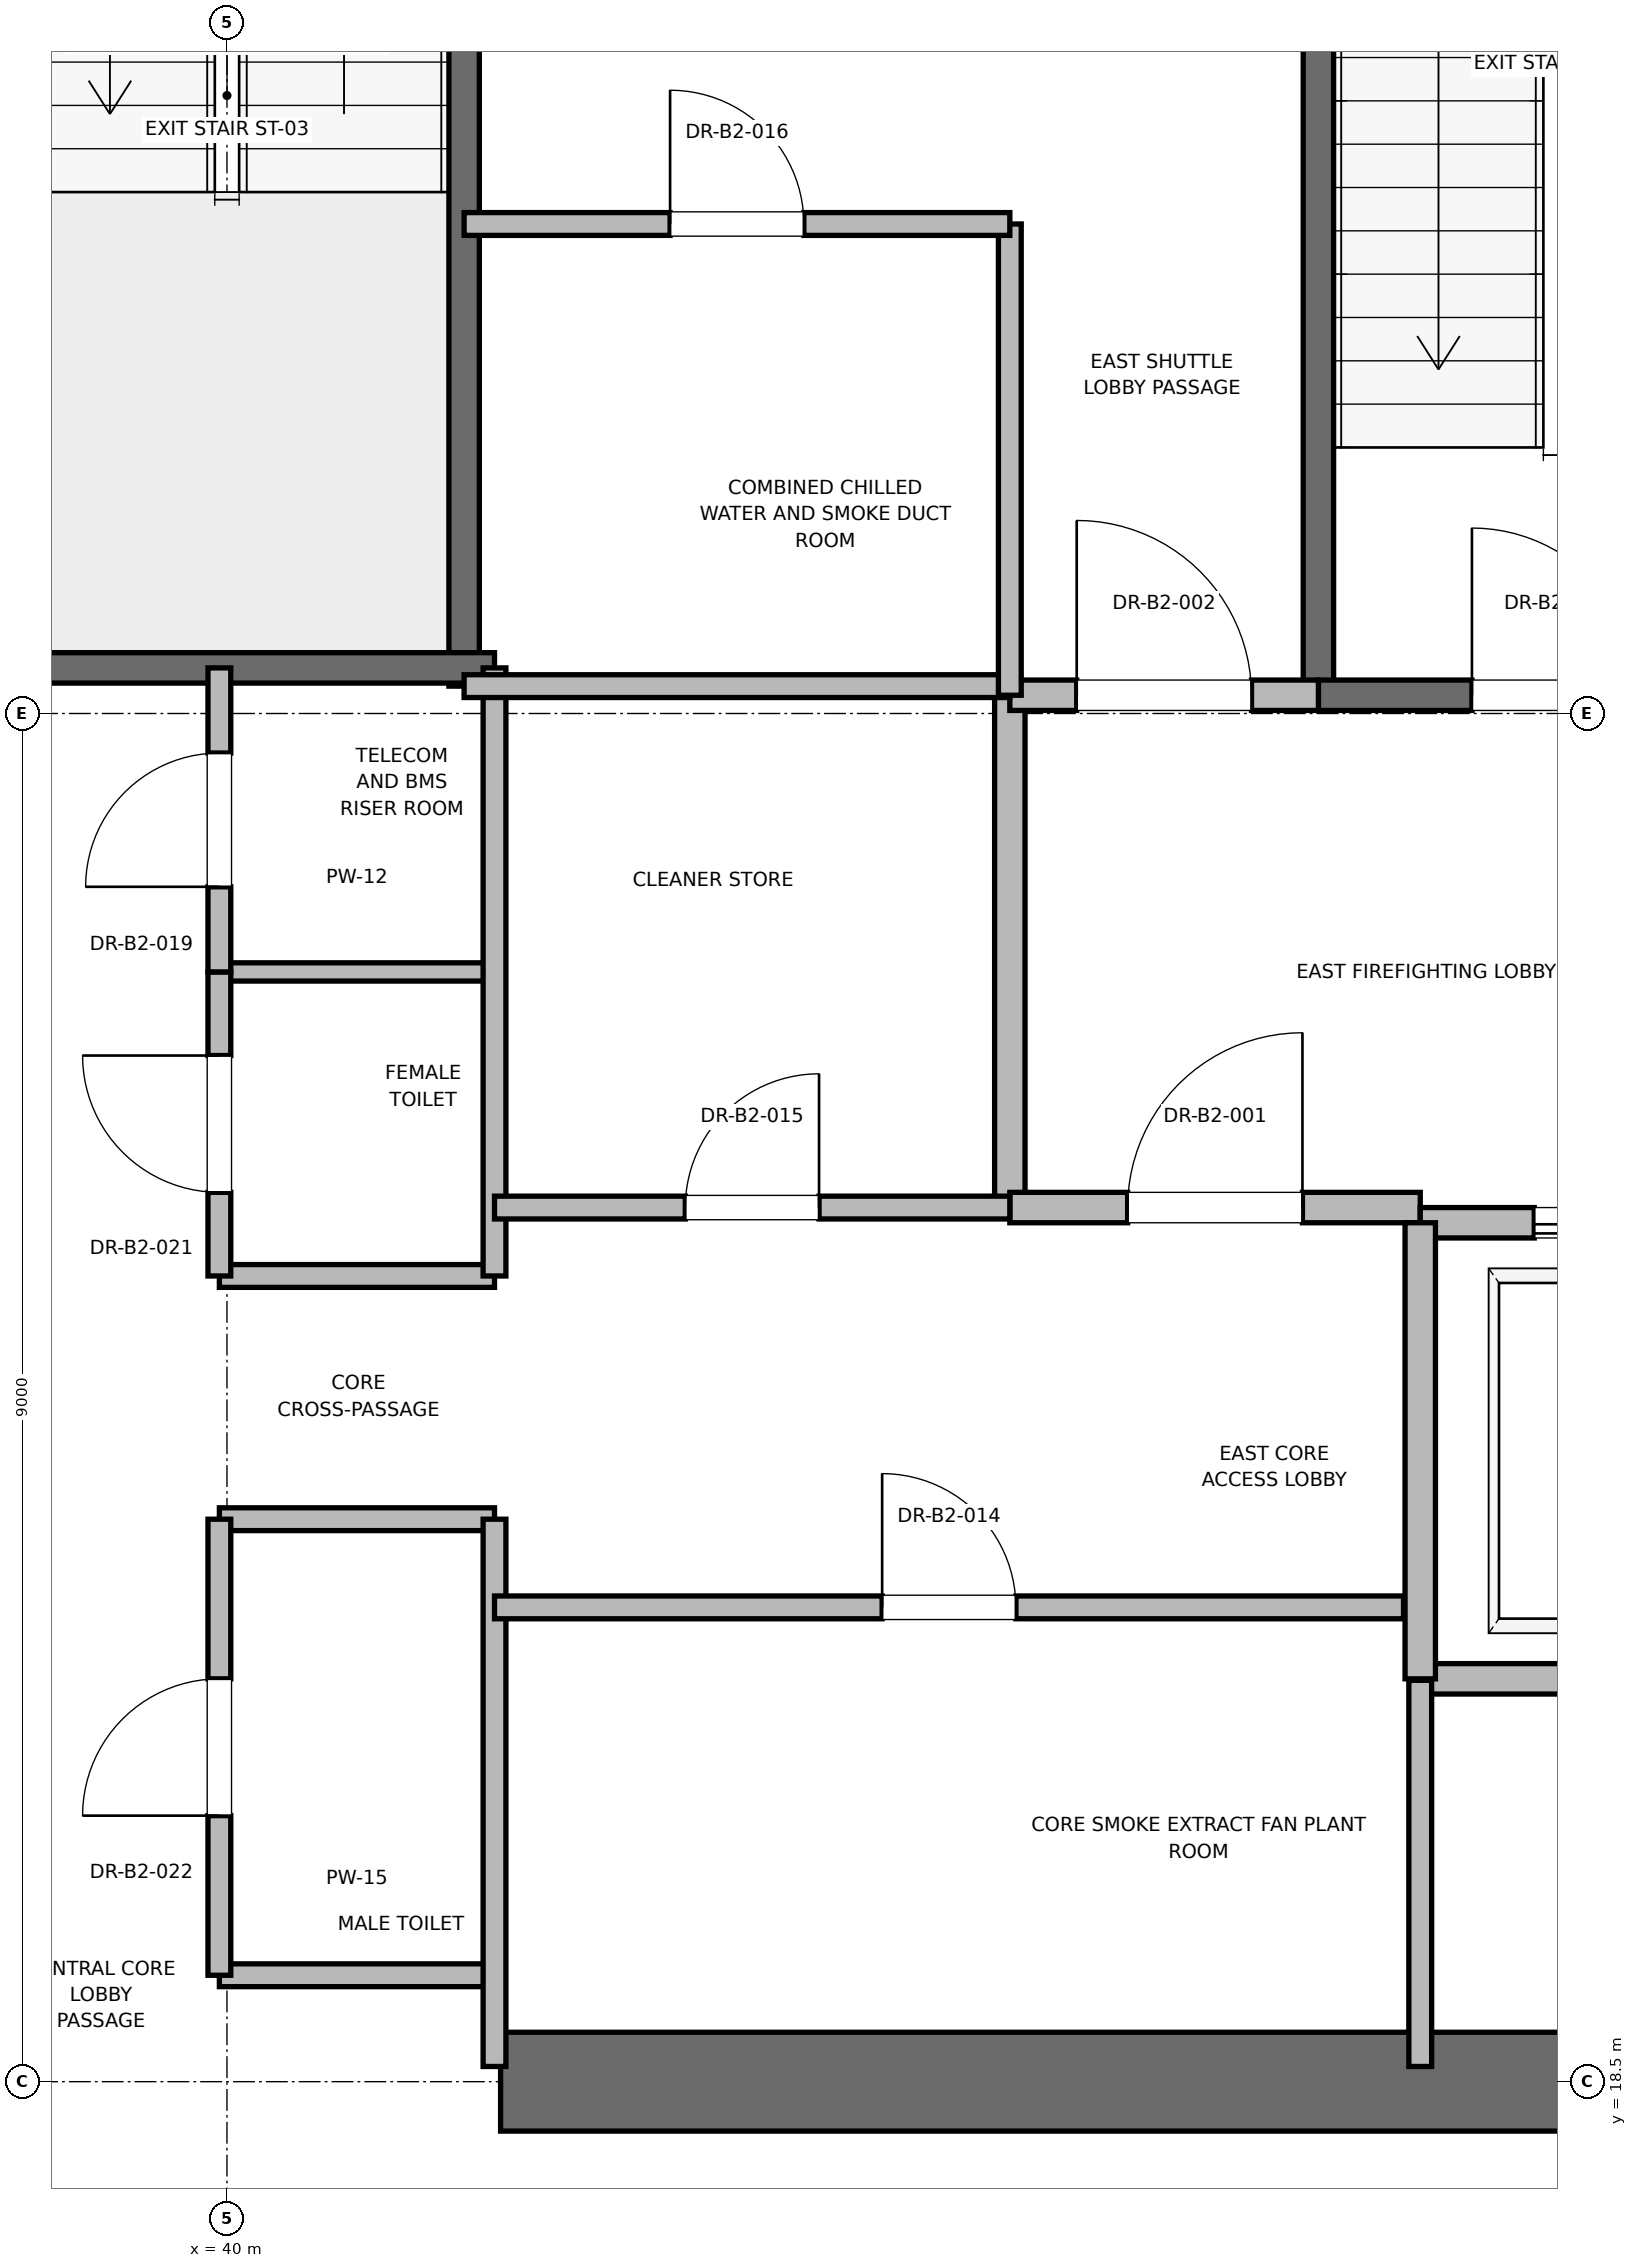
"""IFC4 building model, lengths in metres.
Left out: names, types, materials, properties, quantities, classifications, styles, units other than length and angle.
Written with IfcOpenShell. Run it as: python <this file> out.ifc"""

import sys

from ifc_helpers import new_model, si_unit, direction, frame, frame_2d, origin, place, context, subcontext, project, spatial, rectangle, extrude, element, fill, save


model = new_model("IFC4")
c1 = context("Model", 3, precision=1e-05, world=origin(), true_north=direction((0.0, 1.0)))
c2 = subcontext(c1, "Body", "Model", "MODEL_VIEW")
j1 = project(units=[si_unit("LENGTHUNIT", "METRE"), si_unit("PLANEANGLEUNIT", "RADIAN")], contexts=[c1])
p1 = place(None, origin())
s1 = spatial("IfcSite", under=j1, at=p1, CompositionType="ELEMENT")
p2 = place(p1, origin())
s2 = spatial("IfcBuilding", under=s1, at=p2, CompositionType="ELEMENT")
p3 = place(p2, frame((0.0, 0.0, -9.0)))
s3 = spatial("IfcBuildingStorey", under=s2, at=p3, CompositionType="ELEMENT", Elevation=-9.0)
p4 = place(p3, frame((41.8, 18.5, -0.3), z_axis=(0.0, 0.0, 1.0), x_axis=(1.0, 0.0, 0.0)))
e1 = element("IfcWall", 1, at=p4, inside=s3, PredefinedType="SHEAR", context=c2, shape_type="SweptSolid", body=[
    extrude(rectangle(XDim=9.2, YDim=0.65, at=frame_2d((4.6, 0.0))), origin(), (0.0, 0.0, 1.0), 4.5),
])
p5 = place(p3, frame((47.18, 27.62, -0.3), z_axis=(0.0, 0.0, 1.0), x_axis=(0.0, 1.0, 0.0)))
e2 = element("IfcWall", 2, at=p5, inside=s3, PredefinedType="SOLIDWALL", context=c2, shape_type="SweptSolid", body=[
    extrude(rectangle(XDim=8.18, YDim=0.2, at=frame_2d((4.09, 0.0))), origin(), (0.0, 0.0, 1.0), 4.5),
])
p6 = place(p3, frame((47.18, 27.62, -0.3), z_axis=(0.0, 0.0, 1.0), x_axis=(1.0, 0.0, 0.0)))
e3 = element("IfcWall", 3, at=p6, inside=s3, PredefinedType="SOLIDWALL", context=c2, shape_type="SweptSolid", body=[
    extrude(rectangle(XDim=3.12, YDim=0.2, at=frame_2d((1.56, 0.0))), origin(), (0.0, 0.0, 1.0), 4.5),
])
p7 = place(p6, frame((1.01, 0.0, 0.3)))
e4 = element("IfcOpeningElement", 4, at=p7, cuts=e3, PredefinedType="OPENING", context=c2, shape_type="SweptSolid", body=[
    extrude(rectangle(XDim=1.1, YDim=2.15, at=frame_2d((0.55, 1.075))), frame((0.0, 0.1, 0.0), z_axis=(0.0, -1.0, 0.0), x_axis=(1.0, 0.0, 0.0)), (0.0, 0.0, 1.0), 0.2),
])
p8 = place(p3, frame((41.56, 27.68, -0.3), z_axis=(0.0, 0.0, 1.0), x_axis=(0.0, 1.0, 0.0)))
e5 = element("IfcWall", 5, at=p8, inside=s3, PredefinedType="SOLIDWALL", context=c2, shape_type="SweptSolid", body=[
    extrude(rectangle(XDim=8.57, YDim=0.2, at=frame_2d((4.285, 0.0))), origin(), (0.0, 0.0, 1.0), 4.5),
])
p9 = place(p3, frame((38.44, 27.8, -0.3), z_axis=(0.0, 0.0, 1.0), x_axis=(1.0, 0.0, 0.0)))
e6 = element("IfcWall", 6, at=p9, inside=s3, PredefinedType="SOLIDWALL", context=c2, shape_type="SweptSolid", body=[
    extrude(rectangle(XDim=3.32, YDim=0.2, at=frame_2d((1.66, 0.0))), origin(), (0.0, 0.0, 1.0), 4.5),
])
p10 = place(p3, frame((45.15, 24.25, 0.0), z_axis=(0.0, 0.0, 1.0), x_axis=(0.0, 1.0, 0.0)))
e7 = element("IfcWall", 7, at=p10, inside=s3, PredefinedType="PARTITIONING", context=c2, shape_type="SweptSolid", body=[
    extrude(rectangle(XDim=3.37, YDim=0.2, at=frame_2d((1.685, 0.0))), origin(), (0.0, 0.0, 1.0), 4.2),
])
p11 = place(p3, frame((45.15, 24.25, 0.0), z_axis=(0.0, 0.0, 1.0), x_axis=(1.0, 0.0, 0.0)))
e8 = element("IfcWall", 8, at=p11, inside=s3, PredefinedType="PARTITIONING", context=c2, shape_type="SweptSolid", body=[
    extrude(rectangle(XDim=2.7, YDim=0.2, at=frame_2d((1.35, 0.0))), origin(), (0.0, 0.0, 1.0), 4.2),
])
p12 = place(p11, frame((0.775, 0.0, 0.0)))
e9 = element("IfcOpeningElement", 9, at=p12, cuts=e8, PredefinedType="OPENING", context=c2, shape_type="SweptSolid", body=[
    extrude(rectangle(XDim=1.15, YDim=2.2, at=frame_2d((0.575, 1.1))), frame((0.0, 0.1, 0.0), z_axis=(0.0, -1.0, 0.0), x_axis=(1.0, 0.0, 0.0)), (0.0, 0.0, 1.0), 0.2),
])
p13 = place(p3, frame((45.15, 27.62, 0.0), z_axis=(0.0, 0.0, 1.0), x_axis=(1.0, 0.0, 0.0)))
e10 = element("IfcWall", 10, at=p13, inside=s3, PredefinedType="PARTITIONING", context=c2, shape_type="SweptSolid", body=[
    extrude(rectangle(XDim=2.03, YDim=0.2, at=frame_2d((1.015, 0.0))), origin(), (0.0, 0.0, 1.0), 4.2),
])
p14 = place(p13, frame((0.44, 0.0, 0.0)))
e11 = element("IfcOpeningElement", 11, at=p14, cuts=e10, PredefinedType="OPENING", context=c2, shape_type="SweptSolid", body=[
    extrude(rectangle(XDim=1.15, YDim=2.2, at=frame_2d((0.575, 1.1))), frame((0.0, 0.1, 0.0), z_axis=(0.0, -1.0, 0.0), x_axis=(1.0, 0.0, 0.0)), (0.0, 0.0, 1.0), 0.2),
])
p15 = place(p3, frame((47.85, 21.15, 0.0), z_axis=(0.0, 0.0, 1.0), x_axis=(1.0, 0.0, 0.0)))
e12 = element("IfcWall", 12, at=p15, inside=s3, PredefinedType="SOLIDWALL", context=c2, shape_type="SweptSolid", body=[
    extrude(rectangle(XDim=2.6, YDim=0.2, at=frame_2d((1.3, 0.0))), origin(), (0.0, 0.0, 1.0), 4.2),
])
p16 = place(p3, frame((50.45, 24.15, 0.0), z_axis=(0.0, 0.0, 1.0), x_axis=(-1.0, 0.0, 0.0)))
e13 = element("IfcWall", 13, at=p16, inside=s3, PredefinedType="SOLIDWALL", context=c2, shape_type="SweptSolid", body=[
    extrude(rectangle(XDim=2.6, YDim=0.2, at=frame_2d((1.3, 0.0))), origin(), (0.0, 0.0, 1.0), 2.98),
])
p17 = place(p16, frame((0.75, 0.0, 0.0)))
e14 = element("IfcOpeningElement", 14, at=p17, cuts=e13, PredefinedType="OPENING", context=c2, shape_type="SweptSolid", body=[
    extrude(rectangle(XDim=1.1, YDim=2.2, at=frame_2d((0.55, 1.1))), frame((0.0, 0.1, 0.0), z_axis=(0.0, -1.0, 0.0), x_axis=(1.0, 0.0, 0.0)), (0.0, 0.0, 1.0), 0.2),
])
p18 = place(p3, frame((47.85, 24.15, 0.0), z_axis=(0.0, 0.0, 1.0), x_axis=(0.0, -1.0, 0.0)))
e15 = element("IfcWall", 15, at=p18, inside=s3, PredefinedType="SOLIDWALL", context=c2, shape_type="SweptSolid", body=[
    extrude(rectangle(XDim=3.0, YDim=0.2, at=frame_2d((1.5, 0.0))), origin(), (0.0, 0.0, 1.0), 4.2),
])
for number, where, z_axis, x_axis in (
    (16, (39.95, 19.2, 0.0), (0.0, 0.0, 1.0), (1.0, 0.0, 0.0)),
    (17, (39.95, 22.2, 0.0), (0.0, 0.0, 1.0), (1.0, 0.0, 0.0)),
    (18, (39.95, 23.8, 0.0), (0.0, 0.0, 1.0), (1.0, 0.0, 0.0)),
):
    element("IfcWall", number, at=place(p3, frame(where, z_axis=z_axis, x_axis=x_axis)), inside=s3, PredefinedType="PARTITIONING", context=c2, shape_type="SweptSolid", body=[
        extrude(rectangle(XDim=1.81, YDim=0.15, at=frame_2d((0.905, 0.0))), origin(), (0.0, 0.0, 1.0), 2.85),
    ])
p19 = place(p3, frame((39.95, 25.8, 0.0), z_axis=(0.0, 0.0, 1.0), x_axis=(1.0, 0.0, 0.0)))
e19 = element("IfcWall", 19, at=p19, inside=s3, PredefinedType="PARTITIONING", context=c2, shape_type="SweptSolid", body=[
    extrude(rectangle(XDim=1.81, YDim=0.12, at=frame_2d((0.905, 0.0))), origin(), (0.0, 0.0, 1.0), 2.85),
])
p20 = place(p3, frame((41.76, 18.6, 0.0), z_axis=(0.0, 0.0, 1.0), x_axis=(0.0, 1.0, 0.0)))
e20 = element("IfcWall", 20, at=p20, inside=s3, PredefinedType="PARTITIONING", context=c2, shape_type="SweptSolid", body=[
    extrude(rectangle(XDim=3.6, YDim=0.15, at=frame_2d((1.8, 0.0))), origin(), (0.0, 0.0, 1.0), 2.85),
])
p21 = place(p3, frame((41.76, 23.8, 0.0), z_axis=(0.0, 0.0, 1.0), x_axis=(0.0, 1.0, 0.0)))
e21 = element("IfcWall", 21, at=p21, inside=s3, PredefinedType="PARTITIONING", context=c2, shape_type="SweptSolid", body=[
    extrude(rectangle(XDim=4.0, YDim=0.15, at=frame_2d((2.0, 0.0))), origin(), (0.0, 0.0, 1.0), 2.85),
])
p22 = place(p3, frame((39.95, 19.2, 0.0), z_axis=(0.0, 0.0, 1.0), x_axis=(0.0, 1.0, 0.0)))
e22 = element("IfcWall", 22, at=p22, inside=s3, PredefinedType="PARTITIONING", context=c2, shape_type="SweptSolid", body=[
    extrude(rectangle(XDim=3.0, YDim=0.15, at=frame_2d((1.5, 0.0))), origin(), (0.0, 0.0, 1.0), 2.85),
])
p23 = place(p22, frame((1.05, 0.0, 0.0)))
e23 = element("IfcOpeningElement", 23, at=p23, cuts=e22, PredefinedType="OPENING", context=c2, shape_type="SweptSolid", body=[
    extrude(rectangle(XDim=0.9, YDim=2.1, at=frame_2d((0.45, 1.05))), frame((0.0, 0.075, 0.0), z_axis=(0.0, -1.0, 0.0), x_axis=(1.0, 0.0, 0.0)), (0.0, 0.0, 1.0), 0.15),
])
p24 = place(p3, frame((39.95, 23.8, 0.0), z_axis=(0.0, 0.0, 1.0), x_axis=(0.0, 1.0, 0.0)))
e24 = element("IfcWall", 24, at=p24, inside=s3, PredefinedType="PARTITIONING", context=c2, shape_type="SweptSolid", body=[
    extrude(rectangle(XDim=2.0, YDim=0.15, at=frame_2d((1.0, 0.0))), origin(), (0.0, 0.0, 1.0), 2.85),
])
p25 = place(p24, frame((0.55, 0.0, 0.0)))
e25 = element("IfcOpeningElement", 25, at=p25, cuts=e24, PredefinedType="OPENING", context=c2, shape_type="SweptSolid", body=[
    extrude(rectangle(XDim=0.9, YDim=2.1, at=frame_2d((0.45, 1.05))), frame((0.0, 0.075, 0.0), z_axis=(0.0, -1.0, 0.0), x_axis=(1.0, 0.0, 0.0)), (0.0, 0.0, 1.0), 0.15),
])
p26 = place(p3, frame((39.95, 25.8, 0.0), z_axis=(0.0, 0.0, 1.0), x_axis=(0.0, 1.0, 0.0)))
e26 = element("IfcWall", 26, at=p26, inside=s3, PredefinedType="PARTITIONING", context=c2, shape_type="SweptSolid", body=[
    extrude(rectangle(XDim=2.0, YDim=0.15, at=frame_2d((1.0, 0.0))), origin(), (0.0, 0.0, 1.0), 2.85),
])
p27 = place(p26, frame((0.56, 0.0, 0.0)))
e27 = element("IfcOpeningElement", 27, at=p27, cuts=e26, PredefinedType="OPENING", context=c2, shape_type="SweptSolid", body=[
    extrude(rectangle(XDim=0.88, YDim=2.1, at=frame_2d((0.44, 1.05))), frame((0.0, 0.075, 0.0), z_axis=(0.0, -1.0, 0.0), x_axis=(1.0, 0.0, 0.0)), (0.0, 0.0, 1.0), 0.15),
])
p28 = place(p3, frame((41.56, 27.68, 0.0), z_axis=(0.0, 0.0, 1.0), x_axis=(1.0, 0.0, 0.0)))
e28 = element("IfcWall", 28, at=p28, inside=s3, PredefinedType="PARTITIONING", context=c2, shape_type="SweptSolid", body=[
    extrude(rectangle(XDim=3.59, YDim=0.15, at=frame_2d((1.795, 0.0))), origin(), (0.0, 0.0, 1.0), 2.85),
])
p29 = place(p3, frame((47.85, 18.6, 0.0), z_axis=(0.0, 0.0, 1.0), x_axis=(0.0, 1.0, 0.0)))
e29 = element("IfcWall", 29, at=p29, inside=s3, PredefinedType="PARTITIONING", context=c2, shape_type="SweptSolid", body=[
    extrude(rectangle(XDim=2.54, YDim=0.15, at=frame_2d((1.27, 0.0))), origin(), (0.0, 0.0, 1.0), 2.85),
])
p30 = place(p3, frame((41.76, 21.62, 0.0), z_axis=(0.0, 0.0, 1.0), x_axis=(1.0, 0.0, 0.0)))
e30 = element("IfcWall", 30, at=p30, inside=s3, PredefinedType="PARTITIONING", context=c2, shape_type="SweptSolid", body=[
    extrude(rectangle(XDim=5.98, YDim=0.15, at=frame_2d((2.99, 0.0))), origin(), (0.0, 0.0, 1.0), 2.85),
])
p31 = place(p30, frame((2.55, 0.0, 0.0)))
e31 = element("IfcOpeningElement", 31, at=p31, cuts=e30, PredefinedType="OPENING", context=c2, shape_type="SweptSolid", body=[
    extrude(rectangle(XDim=0.88, YDim=2.1, at=frame_2d((0.44, 1.05))), frame((0.0, 0.075, 0.0), z_axis=(0.0, -1.0, 0.0), x_axis=(1.0, 0.0, 0.0)), (0.0, 0.0, 1.0), 0.15),
])
p32 = place(p3, frame((41.76, 24.25, 0.0), z_axis=(0.0, 0.0, 1.0), x_axis=(1.0, 0.0, 0.0)))
e32 = element("IfcWall", 32, at=p32, inside=s3, PredefinedType="PARTITIONING", context=c2, shape_type="SweptSolid", body=[
    extrude(rectangle(XDim=3.39, YDim=0.15, at=frame_2d((1.695, 0.0))), origin(), (0.0, 0.0, 1.0), 2.85),
])
p33 = place(p32, frame((1.255, 0.0, 0.0)))
e33 = element("IfcOpeningElement", 33, at=p33, cuts=e32, PredefinedType="OPENING", context=c2, shape_type="SweptSolid", body=[
    extrude(rectangle(XDim=0.88, YDim=2.1, at=frame_2d((0.44, 1.05))), frame((0.0, 0.075, 0.0), z_axis=(0.0, -1.0, 0.0), x_axis=(1.0, 0.0, 0.0)), (0.0, 0.0, 1.0), 0.15),
])
p34 = place(p3, frame((45.15, 27.62, 0.0), z_axis=(0.0, 0.0, 1.0), x_axis=(0.0, 1.0, 0.0)))
e34 = element("IfcWall", 34, at=p34, inside=s3, PredefinedType="PARTITIONING", context=c2, shape_type="SweptSolid", body=[
    extrude(rectangle(XDim=3.1, YDim=0.15, at=frame_2d((1.55, 0.0))), origin(), (0.0, 0.0, 1.0), 2.85),
])
p35 = place(p3, frame((41.56, 30.72, 0.0), z_axis=(0.0, 0.0, 1.0), x_axis=(1.0, 0.0, 0.0)))
e35 = element("IfcWall", 35, at=p35, inside=s3, PredefinedType="PARTITIONING", context=c2, shape_type="SweptSolid", body=[
    extrude(rectangle(XDim=3.59, YDim=0.15, at=frame_2d((1.795, 0.0))), origin(), (0.0, 0.0, 1.0), 2.85),
])
p36 = place(p35, frame((1.355, 0.0, 0.0)))
e36 = element("IfcOpeningElement", 36, at=p36, cuts=e35, PredefinedType="OPENING", context=c2, shape_type="SweptSolid", body=[
    extrude(rectangle(XDim=0.88, YDim=2.1, at=frame_2d((0.44, 1.05))), frame((0.0, 0.075, 0.0), z_axis=(0.0, -1.0, 0.0), x_axis=(1.0, 0.0, 0.0)), (0.0, 0.0, 1.0), 0.15),
])
p37 = place(p7, origin())
e37 = element("IfcDoor", 37, at=p37, inside=s3, OperationType="SINGLE_SWING_LEFT", PredefinedType="DOOR", context=c2, shape_type="SweptSolid", body=[
    extrude(rectangle(XDim=1.1, YDim=2.15, at=frame_2d((0.55, 1.075))), frame((0.0, 0.025, 0.0), z_axis=(0.0, -1.0, 0.0), x_axis=(1.0, 0.0, 0.0)), (0.0, 0.0, 1.0), 0.05),
])
fill(e4, e37)
p38 = place(p12, origin())
e38 = element("IfcDoor", 38, at=p38, inside=s3, OperationType="SINGLE_SWING_RIGHT", PredefinedType="DOOR", context=c2, shape_type="SweptSolid", body=[
    extrude(rectangle(XDim=1.15, YDim=2.2, at=frame_2d((0.575, 1.1))), frame((0.0, 0.025, 0.0), z_axis=(0.0, -1.0, 0.0), x_axis=(1.0, 0.0, 0.0)), (0.0, 0.0, 1.0), 0.05),
])
fill(e9, e38)
p39 = place(p14, origin())
e39 = element("IfcDoor", 39, at=p39, inside=s3, OperationType="SINGLE_SWING_LEFT", PredefinedType="DOOR", context=c2, shape_type="SweptSolid", body=[
    extrude(rectangle(XDim=1.15, YDim=2.2, at=frame_2d((0.575, 1.1))), frame((0.0, 0.025, 0.0), z_axis=(0.0, -1.0, 0.0), x_axis=(1.0, 0.0, 0.0)), (0.0, 0.0, 1.0), 0.05),
])
fill(e11, e39)
p40 = place(p17, origin())
e40 = element("IfcDoor", 40, at=p40, inside=s3, OperationType="SLIDING_TO_RIGHT", PredefinedType="DOOR", context=c2, shape_type="SweptSolid", body=[
    extrude(rectangle(XDim=1.1, YDim=2.2, at=frame_2d((0.55, 1.1))), frame((0.0, 0.025, 0.0), z_axis=(0.0, -1.0, 0.0), x_axis=(1.0, 0.0, 0.0)), (0.0, 0.0, 1.0), 0.05),
])
fill(e14, e40)
p41 = place(p23, origin())
e41 = element("IfcDoor", 41, at=p41, inside=s3, OperationType="SINGLE_SWING_LEFT", PredefinedType="DOOR", context=c2, shape_type="SweptSolid", body=[
    extrude(rectangle(XDim=0.9, YDim=2.1, at=frame_2d((0.45, 1.05))), frame((0.0, 0.025, 0.0), z_axis=(0.0, -1.0, 0.0), x_axis=(1.0, 0.0, 0.0)), (0.0, 0.0, 1.0), 0.05),
])
fill(e23, e41)
p42 = place(p25, origin())
e42 = element("IfcDoor", 42, at=p42, inside=s3, OperationType="SINGLE_SWING_RIGHT", PredefinedType="DOOR", context=c2, shape_type="SweptSolid", body=[
    extrude(rectangle(XDim=0.9, YDim=2.1, at=frame_2d((0.45, 1.05))), frame((0.0, 0.025, 0.0), z_axis=(0.0, -1.0, 0.0), x_axis=(1.0, 0.0, 0.0)), (0.0, 0.0, 1.0), 0.05),
])
fill(e25, e42)
p43 = place(p27, origin())
e43 = element("IfcDoor", 43, at=p43, inside=s3, OperationType="SINGLE_SWING_LEFT", PredefinedType="DOOR", context=c2, shape_type="SweptSolid", body=[
    extrude(rectangle(XDim=0.88, YDim=2.1, at=frame_2d((0.44, 1.05))), frame((0.0, 0.025, 0.0), z_axis=(0.0, -1.0, 0.0), x_axis=(1.0, 0.0, 0.0)), (0.0, 0.0, 1.0), 0.05),
])
fill(e27, e43)
p44 = place(p31, origin())
e44 = element("IfcDoor", 44, at=p44, inside=s3, OperationType="SINGLE_SWING_LEFT", PredefinedType="DOOR", context=c2, shape_type="SweptSolid", body=[
    extrude(rectangle(XDim=0.88, YDim=2.1, at=frame_2d((0.44, 1.05))), frame((0.0, 0.025, 0.0), z_axis=(0.0, -1.0, 0.0), x_axis=(1.0, 0.0, 0.0)), (0.0, 0.0, 1.0), 0.05),
])
fill(e31, e44)
p45 = place(p33, origin())
e45 = element("IfcDoor", 45, at=p45, inside=s3, OperationType="SINGLE_SWING_RIGHT", PredefinedType="DOOR", context=c2, shape_type="SweptSolid", body=[
    extrude(rectangle(XDim=0.88, YDim=2.1, at=frame_2d((0.44, 1.05))), frame((0.0, 0.025, 0.0), z_axis=(0.0, -1.0, 0.0), x_axis=(1.0, 0.0, 0.0)), (0.0, 0.0, 1.0), 0.05),
])
fill(e33, e45)
p46 = place(p36, origin())
e46 = element("IfcDoor", 46, at=p46, inside=s3, OperationType="SINGLE_SWING_LEFT", PredefinedType="DOOR", context=c2, shape_type="SweptSolid", body=[
    extrude(rectangle(XDim=0.88, YDim=2.1, at=frame_2d((0.44, 1.05))), frame((0.0, 0.025, 0.0), z_axis=(0.0, -1.0, 0.0), x_axis=(1.0, 0.0, 0.0)), (0.0, 0.0, 1.0), 0.05),
])
fill(e36, e46)
save(model, sys.argv[1])
